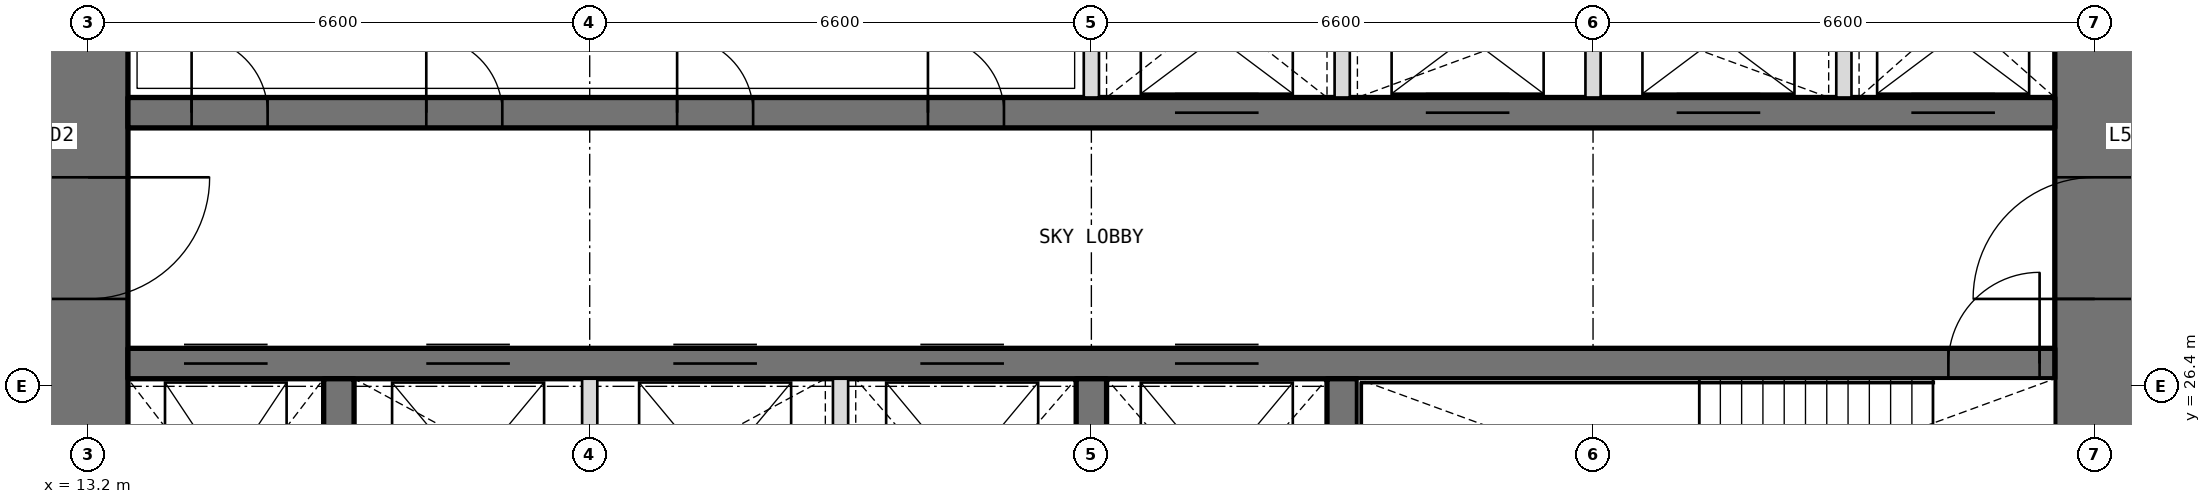
"""IFC4 building model, lengths in metres.
Left out: names, types, materials, properties, quantities, classifications, styles, units other than length and angle.
Written with IfcOpenShell. Run it as: python <this file> out.ifc"""

import sys

from ifc_helpers import new_model, si_unit, direction, frame, frame_2d, origin, place, context, subcontext, project, spatial, rectangle, extrude, element, fill, save


model = new_model("IFC4")
c1 = context("Model", 3, precision=1e-05, world=origin(), true_north=direction((0.0, 1.0)))
c2 = subcontext(c1, "Body", "Model", "MODEL_VIEW")
j1 = project(units=[si_unit("LENGTHUNIT", "METRE"), si_unit("PLANEANGLEUNIT", "RADIAN")], contexts=[c1])
p1 = place(None, origin())
s1 = spatial("IfcSite", under=j1, at=p1, CompositionType="ELEMENT")
p2 = place(p1, origin())
s2 = spatial("IfcBuilding", under=s1, at=p2, CompositionType="ELEMENT")
p3 = place(p2, frame((0.0, 0.0, 229.2)))
s3 = spatial("IfcBuildingStorey", under=s2, at=p3, CompositionType="ELEMENT", Elevation=229.2)
p4 = place(p3, frame((39.6, 13.725, 0.0), z_axis=(0.0, 0.0, 1.0), x_axis=(0.0, 1.0, 0.0)))
e1 = element("IfcWall", 1, at=p4, inside=s3, PredefinedType="SHEAR", context=c2, shape_type="SweptSolid", body=[
    extrude(rectangle(XDim=18.75, YDim=1.05, at=frame_2d((9.375, 0.0))), origin(), (0.0, 0.0, 1.0), 4.2),
])
p5 = place(p4, frame((3.025, 0.0, 0.0)))
e2 = element("IfcOpeningElement", 2, at=p5, cuts=e1, PredefinedType="OPENING", context=c2, shape_type="SweptSolid", body=[
    extrude(rectangle(XDim=1.6, YDim=2.1, at=frame_2d((0.8, 1.05))), frame((0.0, 0.535, 0.0), z_axis=(0.0, -1.0, 0.0), x_axis=(1.0, 0.0, 0.0)), (0.0, 0.0, 1.0), 1.07),
])
p6 = place(p4, frame((13.825, 0.0, 0.0)))
e3 = element("IfcOpeningElement", 3, at=p6, cuts=e1, PredefinedType="OPENING", context=c2, shape_type="SweptSolid", body=[
    extrude(rectangle(XDim=1.6, YDim=2.1, at=frame_2d((0.8, 1.05))), frame((0.0, 0.535, 0.0), z_axis=(0.0, -1.0, 0.0), x_axis=(1.0, 0.0, 0.0)), (0.0, 0.0, 1.0), 1.07),
])
p7 = place(p3, frame((13.2, 32.475, 0.0), z_axis=(0.0, 0.0, 1.0), x_axis=(0.0, -1.0, 0.0)))
e4 = element("IfcWall", 4, at=p7, inside=s3, PredefinedType="SHEAR", context=c2, shape_type="SweptSolid", body=[
    extrude(rectangle(XDim=18.75, YDim=1.05, at=frame_2d((9.375, 0.0))), origin(), (0.0, 0.0, 1.0), 4.2),
])
p8 = place(p7, frame((14.125, 0.0, 0.0)))
e5 = element("IfcOpeningElement", 5, at=p8, cuts=e4, PredefinedType="OPENING", context=c2, shape_type="SweptSolid", body=[
    extrude(rectangle(XDim=1.6, YDim=2.1, at=frame_2d((0.8, 1.05))), frame((0.0, 0.535, 0.0), z_axis=(0.0, -1.0, 0.0), x_axis=(1.0, 0.0, 0.0)), (0.0, 0.0, 1.0), 1.07),
])
p9 = place(p7, frame((3.325, 0.0, 0.0)))
e6 = element("IfcOpeningElement", 6, at=p9, cuts=e4, PredefinedType="OPENING", context=c2, shape_type="SweptSolid", body=[
    extrude(rectangle(XDim=1.6, YDim=2.1, at=frame_2d((0.8, 1.05))), frame((0.0, 0.535, 0.0), z_axis=(0.0, -1.0, 0.0), x_axis=(1.0, 0.0, 0.0)), (0.0, 0.0, 1.0), 1.07),
])
p10 = place(p3, frame((13.725, 26.7, 0.0), z_axis=(0.0, 0.0, 1.0), x_axis=(1.0, 0.0, 0.0)))
e7 = element("IfcWall", 7, at=p10, inside=s3, PredefinedType="SHEAR", context=c2, shape_type="SweptSolid", body=[
    extrude(rectangle(XDim=25.35, YDim=0.4, at=frame_2d((12.675, 0.0))), origin(), (0.0, 0.0, 1.0), 4.2),
])
p11 = place(p10, frame((23.95, 0.0, 0.0)))
e8 = element("IfcOpeningElement", 8, at=p11, cuts=e7, PredefinedType="OPENING", context=c2, shape_type="SweptSolid", body=[
    extrude(rectangle(XDim=1.2, YDim=2.1, at=frame_2d((0.6, 1.05))), frame((0.0, 0.21, 0.0), z_axis=(0.0, -1.0, 0.0), x_axis=(1.0, 0.0, 0.0)), (0.0, 0.0, 1.0), 0.42),
])
p12 = place(p10, frame((0.738, 0.0, 0.0)))
e9 = element("IfcOpeningElement", 9, at=p12, cuts=e7, PredefinedType="OPENING", context=c2, shape_type="SweptSolid", body=[
    extrude(rectangle(XDim=1.1, YDim=2.1, at=frame_2d((0.55, 1.05))), frame((0.0, 0.21, 0.0), z_axis=(0.0, -1.0, 0.0), x_axis=(1.0, 0.0, 0.0)), (0.0, 0.0, 1.0), 0.42),
])
p13 = place(p10, frame((3.925, 0.0, 0.0)))
e10 = element("IfcOpeningElement", 10, at=p13, cuts=e7, PredefinedType="OPENING", context=c2, shape_type="SweptSolid", body=[
    extrude(rectangle(XDim=1.1, YDim=2.1, at=frame_2d((0.55, 1.05))), frame((0.0, 0.21, 0.0), z_axis=(0.0, -1.0, 0.0), x_axis=(1.0, 0.0, 0.0)), (0.0, 0.0, 1.0), 0.42),
])
p14 = place(p10, frame((7.175, 0.0, 0.0)))
e11 = element("IfcOpeningElement", 11, at=p14, cuts=e7, PredefinedType="OPENING", context=c2, shape_type="SweptSolid", body=[
    extrude(rectangle(XDim=1.1, YDim=2.1, at=frame_2d((0.55, 1.05))), frame((0.0, 0.21, 0.0), z_axis=(0.0, -1.0, 0.0), x_axis=(1.0, 0.0, 0.0)), (0.0, 0.0, 1.0), 0.42),
])
p15 = place(p10, frame((10.425, 0.0, 0.0)))
e12 = element("IfcOpeningElement", 12, at=p15, cuts=e7, PredefinedType="OPENING", context=c2, shape_type="SweptSolid", body=[
    extrude(rectangle(XDim=1.1, YDim=2.1, at=frame_2d((0.55, 1.05))), frame((0.0, 0.21, 0.0), z_axis=(0.0, -1.0, 0.0), x_axis=(1.0, 0.0, 0.0)), (0.0, 0.0, 1.0), 0.42),
])
p16 = place(p10, frame((13.775, 0.0, 0.0)))
e13 = element("IfcOpeningElement", 13, at=p16, cuts=e7, PredefinedType="OPENING", context=c2, shape_type="SweptSolid", body=[
    extrude(rectangle(XDim=1.1, YDim=2.1, at=frame_2d((0.55, 1.05))), frame((0.0, 0.21, 0.0), z_axis=(0.0, -1.0, 0.0), x_axis=(1.0, 0.0, 0.0)), (0.0, 0.0, 1.0), 0.42),
])
p17 = place(p3, frame((13.725, 30.0, 0.0), z_axis=(0.0, 0.0, 1.0), x_axis=(1.0, 0.0, 0.0)))
e14 = element("IfcWall", 14, at=p17, inside=s3, PredefinedType="SHEAR", context=c2, shape_type="SweptSolid", body=[
    extrude(rectangle(XDim=25.35, YDim=0.4, at=frame_2d((12.675, 0.0))), origin(), (0.0, 0.0, 1.0), 4.2),
])
p18 = place(p17, frame((0.837, 0.0, 0.0)))
e15 = element("IfcOpeningElement", 15, at=p18, cuts=e14, PredefinedType="OPENING", context=c2, shape_type="SweptSolid", body=[
    extrude(rectangle(XDim=1.0, YDim=2.1, at=frame_2d((0.5, 1.05))), frame((0.0, 0.21, 0.0), z_axis=(0.0, -1.0, 0.0), x_axis=(1.0, 0.0, 0.0)), (0.0, 0.0, 1.0), 0.42),
])
p19 = place(p17, frame((3.925, 0.0, 0.0)))
e16 = element("IfcOpeningElement", 16, at=p19, cuts=e14, PredefinedType="OPENING", context=c2, shape_type="SweptSolid", body=[
    extrude(rectangle(XDim=1.0, YDim=2.1, at=frame_2d((0.5, 1.05))), frame((0.0, 0.21, 0.0), z_axis=(0.0, -1.0, 0.0), x_axis=(1.0, 0.0, 0.0)), (0.0, 0.0, 1.0), 0.42),
])
p20 = place(p17, frame((7.225, 0.0, 0.0)))
e17 = element("IfcOpeningElement", 17, at=p20, cuts=e14, PredefinedType="OPENING", context=c2, shape_type="SweptSolid", body=[
    extrude(rectangle(XDim=1.0, YDim=2.1, at=frame_2d((0.5, 1.05))), frame((0.0, 0.21, 0.0), z_axis=(0.0, -1.0, 0.0), x_axis=(1.0, 0.0, 0.0)), (0.0, 0.0, 1.0), 0.42),
])
p21 = place(p17, frame((10.525, 0.0, 0.0)))
e18 = element("IfcOpeningElement", 18, at=p21, cuts=e14, PredefinedType="OPENING", context=c2, shape_type="SweptSolid", body=[
    extrude(rectangle(XDim=1.0, YDim=2.1, at=frame_2d((0.5, 1.05))), frame((0.0, 0.21, 0.0), z_axis=(0.0, -1.0, 0.0), x_axis=(1.0, 0.0, 0.0)), (0.0, 0.0, 1.0), 0.42),
])
p22 = place(p17, frame((13.775, 0.0, 0.0)))
e19 = element("IfcOpeningElement", 19, at=p22, cuts=e14, PredefinedType="OPENING", context=c2, shape_type="SweptSolid", body=[
    extrude(rectangle(XDim=1.1, YDim=2.1, at=frame_2d((0.55, 1.05))), frame((0.0, 0.21, 0.0), z_axis=(0.0, -1.0, 0.0), x_axis=(1.0, 0.0, 0.0)), (0.0, 0.0, 1.0), 0.42),
])
p23 = place(p17, frame((17.075, 0.0, 0.0)))
e20 = element("IfcOpeningElement", 20, at=p23, cuts=e14, PredefinedType="OPENING", context=c2, shape_type="SweptSolid", body=[
    extrude(rectangle(XDim=1.1, YDim=2.1, at=frame_2d((0.55, 1.05))), frame((0.0, 0.21, 0.0), z_axis=(0.0, -1.0, 0.0), x_axis=(1.0, 0.0, 0.0)), (0.0, 0.0, 1.0), 0.42),
])
p24 = place(p17, frame((20.375, 0.0, 0.0)))
e21 = element("IfcOpeningElement", 21, at=p24, cuts=e14, PredefinedType="OPENING", context=c2, shape_type="SweptSolid", body=[
    extrude(rectangle(XDim=1.1, YDim=2.1, at=frame_2d((0.55, 1.05))), frame((0.0, 0.21, 0.0), z_axis=(0.0, -1.0, 0.0), x_axis=(1.0, 0.0, 0.0)), (0.0, 0.0, 1.0), 0.42),
])
p25 = place(p17, frame((23.462, 0.0, 0.0)))
e22 = element("IfcOpeningElement", 22, at=p25, cuts=e14, PredefinedType="OPENING", context=c2, shape_type="SweptSolid", body=[
    extrude(rectangle(XDim=1.1, YDim=2.1, at=frame_2d((0.55, 1.05))), frame((0.0, 0.21, 0.0), z_axis=(0.0, -1.0, 0.0), x_axis=(1.0, 0.0, 0.0)), (0.0, 0.0, 1.0), 0.42),
])
for number, where, z_axis, x_axis in (
    (23, (16.5, 23.15, 0.0), (0.0, 0.0, 1.0), (0.0, 1.0, 0.0)),
    (24, (26.4, 23.15, 0.0), (0.0, 0.0, 1.0), (0.0, 1.0, 0.0)),
    (25, (29.7, 23.15, 0.0), (0.0, 0.0, 1.0), (0.0, 1.0, 0.0)),
):
    element("IfcWall", number, at=place(p3, frame(where, z_axis=z_axis, x_axis=x_axis)), inside=s3, PredefinedType="SHEAR", context=c2, shape_type="SweptSolid", body=[
        extrude(rectangle(XDim=3.35, YDim=0.4, at=frame_2d((1.675, 0.0))), origin(), (0.0, 0.0, 1.0), 4.2),
    ])
for number, where, z_axis, x_axis in (
    (26, (26.4, 30.2, 0.0), (0.0, 0.0, 1.0), (0.0, 1.0, 0.0)),
    (27, (29.7, 30.2, 0.0), (0.0, 0.0, 1.0), (0.0, 1.0, 0.0)),
    (28, (33.0, 30.2, 0.0), (0.0, 0.0, 1.0), (0.0, 1.0, 0.0)),
    (29, (36.3, 30.2, 0.0), (0.0, 0.0, 1.0), (0.0, 1.0, 0.0)),
):
    element("IfcWall", number, at=place(p3, frame(where, z_axis=z_axis, x_axis=x_axis)), inside=s3, PredefinedType="PARTITIONING", context=c2, shape_type="SweptSolid", body=[
        extrude(rectangle(XDim=2.275, YDim=0.2, at=frame_2d((1.138, 0.0))), origin(), (0.0, 0.0, 1.0), 4.2),
    ])
for number, where, z_axis, x_axis in (
    (30, (19.8, 23.15, 0.0), (0.0, 0.0, 1.0), (0.0, 1.0, 0.0)),
    (31, (23.1, 23.15, 0.0), (0.0, 0.0, 1.0), (0.0, 1.0, 0.0)),
):
    element("IfcWall", number, at=place(p3, frame(where, z_axis=z_axis, x_axis=x_axis)), inside=s3, PredefinedType="PARTITIONING", context=c2, shape_type="SweptSolid", body=[
        extrude(rectangle(XDim=3.35, YDim=0.2, at=frame_2d((1.675, 0.0))), origin(), (0.0, 0.0, 1.0), 4.2),
    ])
p26 = place(p18, origin())
e32 = element("IfcDoor", 32, at=p26, inside=s3, OperationType="SINGLE_SWING_LEFT", PredefinedType="DOOR", context=c2, shape_type="SweptSolid", body=[
    extrude(rectangle(XDim=1.0, YDim=2.1, at=frame_2d((0.5, 1.05))), frame((0.0, 0.025, 0.0), z_axis=(0.0, -1.0, 0.0), x_axis=(1.0, 0.0, 0.0)), (0.0, 0.0, 1.0), 0.05),
])
fill(e15, e32)
p27 = place(p19, origin())
e33 = element("IfcDoor", 33, at=p27, inside=s3, OperationType="SINGLE_SWING_LEFT", PredefinedType="DOOR", context=c2, shape_type="SweptSolid", body=[
    extrude(rectangle(XDim=1.0, YDim=2.1, at=frame_2d((0.5, 1.05))), frame((0.0, 0.025, 0.0), z_axis=(0.0, -1.0, 0.0), x_axis=(1.0, 0.0, 0.0)), (0.0, 0.0, 1.0), 0.05),
])
fill(e16, e33)
p28 = place(p20, origin())
e34 = element("IfcDoor", 34, at=p28, inside=s3, OperationType="SINGLE_SWING_LEFT", PredefinedType="DOOR", context=c2, shape_type="SweptSolid", body=[
    extrude(rectangle(XDim=1.0, YDim=2.1, at=frame_2d((0.5, 1.05))), frame((0.0, 0.025, 0.0), z_axis=(0.0, -1.0, 0.0), x_axis=(1.0, 0.0, 0.0)), (0.0, 0.0, 1.0), 0.05),
])
fill(e17, e34)
p29 = place(p21, origin())
e35 = element("IfcDoor", 35, at=p29, inside=s3, OperationType="SINGLE_SWING_LEFT", PredefinedType="DOOR", context=c2, shape_type="SweptSolid", body=[
    extrude(rectangle(XDim=1.0, YDim=2.1, at=frame_2d((0.5, 1.05))), frame((0.0, 0.025, 0.0), z_axis=(0.0, -1.0, 0.0), x_axis=(1.0, 0.0, 0.0)), (0.0, 0.0, 1.0), 0.05),
])
fill(e18, e35)
p30 = place(p11, origin())
e36 = element("IfcDoor", 36, at=p30, inside=s3, OperationType="SINGLE_SWING_RIGHT", PredefinedType="DOOR", context=c2, shape_type="SweptSolid", body=[
    extrude(rectangle(XDim=1.2, YDim=2.1, at=frame_2d((0.6, 1.05))), frame((0.0, 0.025, 0.0), z_axis=(0.0, -1.0, 0.0), x_axis=(1.0, 0.0, 0.0)), (0.0, 0.0, 1.0), 0.05),
])
fill(e8, e36)
p31 = place(p9, origin())
e37 = element("IfcDoor", 37, at=p31, inside=s3, OperationType="DOUBLE_DOOR_DOUBLE_SWING", PredefinedType="DOOR", context=c2, shape_type="SweptSolid", body=[
    extrude(rectangle(XDim=1.6, YDim=2.1, at=frame_2d((0.8, 1.05))), frame((0.0, 0.025, 0.0), z_axis=(0.0, -1.0, 0.0), x_axis=(1.0, 0.0, 0.0)), (0.0, 0.0, 1.0), 0.05),
])
fill(e6, e37)
p32 = place(p6, origin())
e38 = element("IfcDoor", 38, at=p32, inside=s3, OperationType="DOUBLE_DOOR_DOUBLE_SWING", PredefinedType="DOOR", context=c2, shape_type="SweptSolid", body=[
    extrude(rectangle(XDim=1.6, YDim=2.1, at=frame_2d((0.8, 1.05))), frame((0.0, 0.025, 0.0), z_axis=(0.0, -1.0, 0.0), x_axis=(1.0, 0.0, 0.0)), (0.0, 0.0, 1.0), 0.05),
])
fill(e3, e38)
p33 = place(p22, origin())
e39 = element("IfcDoor", 39, at=p33, inside=s3, OperationType="DOUBLE_DOOR_SLIDING", PredefinedType="DOOR", context=c2, shape_type="SweptSolid", body=[
    extrude(rectangle(XDim=1.1, YDim=2.1, at=frame_2d((0.55, 1.05))), frame((0.0, 0.025, 0.0), z_axis=(0.0, -1.0, 0.0), x_axis=(1.0, 0.0, 0.0)), (0.0, 0.0, 1.0), 0.05),
])
fill(e19, e39)
p34 = place(p23, origin())
e40 = element("IfcDoor", 40, at=p34, inside=s3, OperationType="DOUBLE_DOOR_SLIDING", PredefinedType="DOOR", context=c2, shape_type="SweptSolid", body=[
    extrude(rectangle(XDim=1.1, YDim=2.1, at=frame_2d((0.55, 1.05))), frame((0.0, 0.025, 0.0), z_axis=(0.0, -1.0, 0.0), x_axis=(1.0, 0.0, 0.0)), (0.0, 0.0, 1.0), 0.05),
])
fill(e20, e40)
p35 = place(p24, origin())
e41 = element("IfcDoor", 41, at=p35, inside=s3, OperationType="DOUBLE_DOOR_SLIDING", PredefinedType="DOOR", context=c2, shape_type="SweptSolid", body=[
    extrude(rectangle(XDim=1.1, YDim=2.1, at=frame_2d((0.55, 1.05))), frame((0.0, 0.025, 0.0), z_axis=(0.0, -1.0, 0.0), x_axis=(1.0, 0.0, 0.0)), (0.0, 0.0, 1.0), 0.05),
])
fill(e21, e41)
p36 = place(p25, origin())
e42 = element("IfcDoor", 42, at=p36, inside=s3, OperationType="DOUBLE_DOOR_SLIDING", PredefinedType="DOOR", context=c2, shape_type="SweptSolid", body=[
    extrude(rectangle(XDim=1.1, YDim=2.1, at=frame_2d((0.55, 1.05))), frame((0.0, 0.025, 0.0), z_axis=(0.0, -1.0, 0.0), x_axis=(1.0, 0.0, 0.0)), (0.0, 0.0, 1.0), 0.05),
])
fill(e22, e42)
p37 = place(p12, origin())
e43 = element("IfcDoor", 43, at=p37, inside=s3, OperationType="DOUBLE_DOOR_SLIDING", PredefinedType="DOOR", context=c2, shape_type="SweptSolid", body=[
    extrude(rectangle(XDim=1.1, YDim=2.1, at=frame_2d((0.55, 1.05))), frame((0.0, 0.025, 0.0), z_axis=(0.0, -1.0, 0.0), x_axis=(1.0, 0.0, 0.0)), (0.0, 0.0, 1.0), 0.05),
])
fill(e9, e43)
p38 = place(p13, origin())
e44 = element("IfcDoor", 44, at=p38, inside=s3, OperationType="DOUBLE_DOOR_SLIDING", PredefinedType="DOOR", context=c2, shape_type="SweptSolid", body=[
    extrude(rectangle(XDim=1.1, YDim=2.1, at=frame_2d((0.55, 1.05))), frame((0.0, 0.025, 0.0), z_axis=(0.0, -1.0, 0.0), x_axis=(1.0, 0.0, 0.0)), (0.0, 0.0, 1.0), 0.05),
])
fill(e10, e44)
p39 = place(p14, origin())
e45 = element("IfcDoor", 45, at=p39, inside=s3, OperationType="DOUBLE_DOOR_SLIDING", PredefinedType="DOOR", context=c2, shape_type="SweptSolid", body=[
    extrude(rectangle(XDim=1.1, YDim=2.1, at=frame_2d((0.55, 1.05))), frame((0.0, 0.025, 0.0), z_axis=(0.0, -1.0, 0.0), x_axis=(1.0, 0.0, 0.0)), (0.0, 0.0, 1.0), 0.05),
])
fill(e11, e45)
p40 = place(p15, origin())
e46 = element("IfcDoor", 46, at=p40, inside=s3, OperationType="DOUBLE_DOOR_SLIDING", PredefinedType="DOOR", context=c2, shape_type="SweptSolid", body=[
    extrude(rectangle(XDim=1.1, YDim=2.1, at=frame_2d((0.55, 1.05))), frame((0.0, 0.025, 0.0), z_axis=(0.0, -1.0, 0.0), x_axis=(1.0, 0.0, 0.0)), (0.0, 0.0, 1.0), 0.05),
])
fill(e12, e46)
p41 = place(p16, origin())
e47 = element("IfcDoor", 47, at=p41, inside=s3, OperationType="DOUBLE_DOOR_SLIDING", PredefinedType="DOOR", context=c2, shape_type="SweptSolid", body=[
    extrude(rectangle(XDim=1.1, YDim=2.1, at=frame_2d((0.55, 1.05))), frame((0.0, 0.025, 0.0), z_axis=(0.0, -1.0, 0.0), x_axis=(1.0, 0.0, 0.0)), (0.0, 0.0, 1.0), 0.05),
])
fill(e13, e47)
save(model, sys.argv[1])
